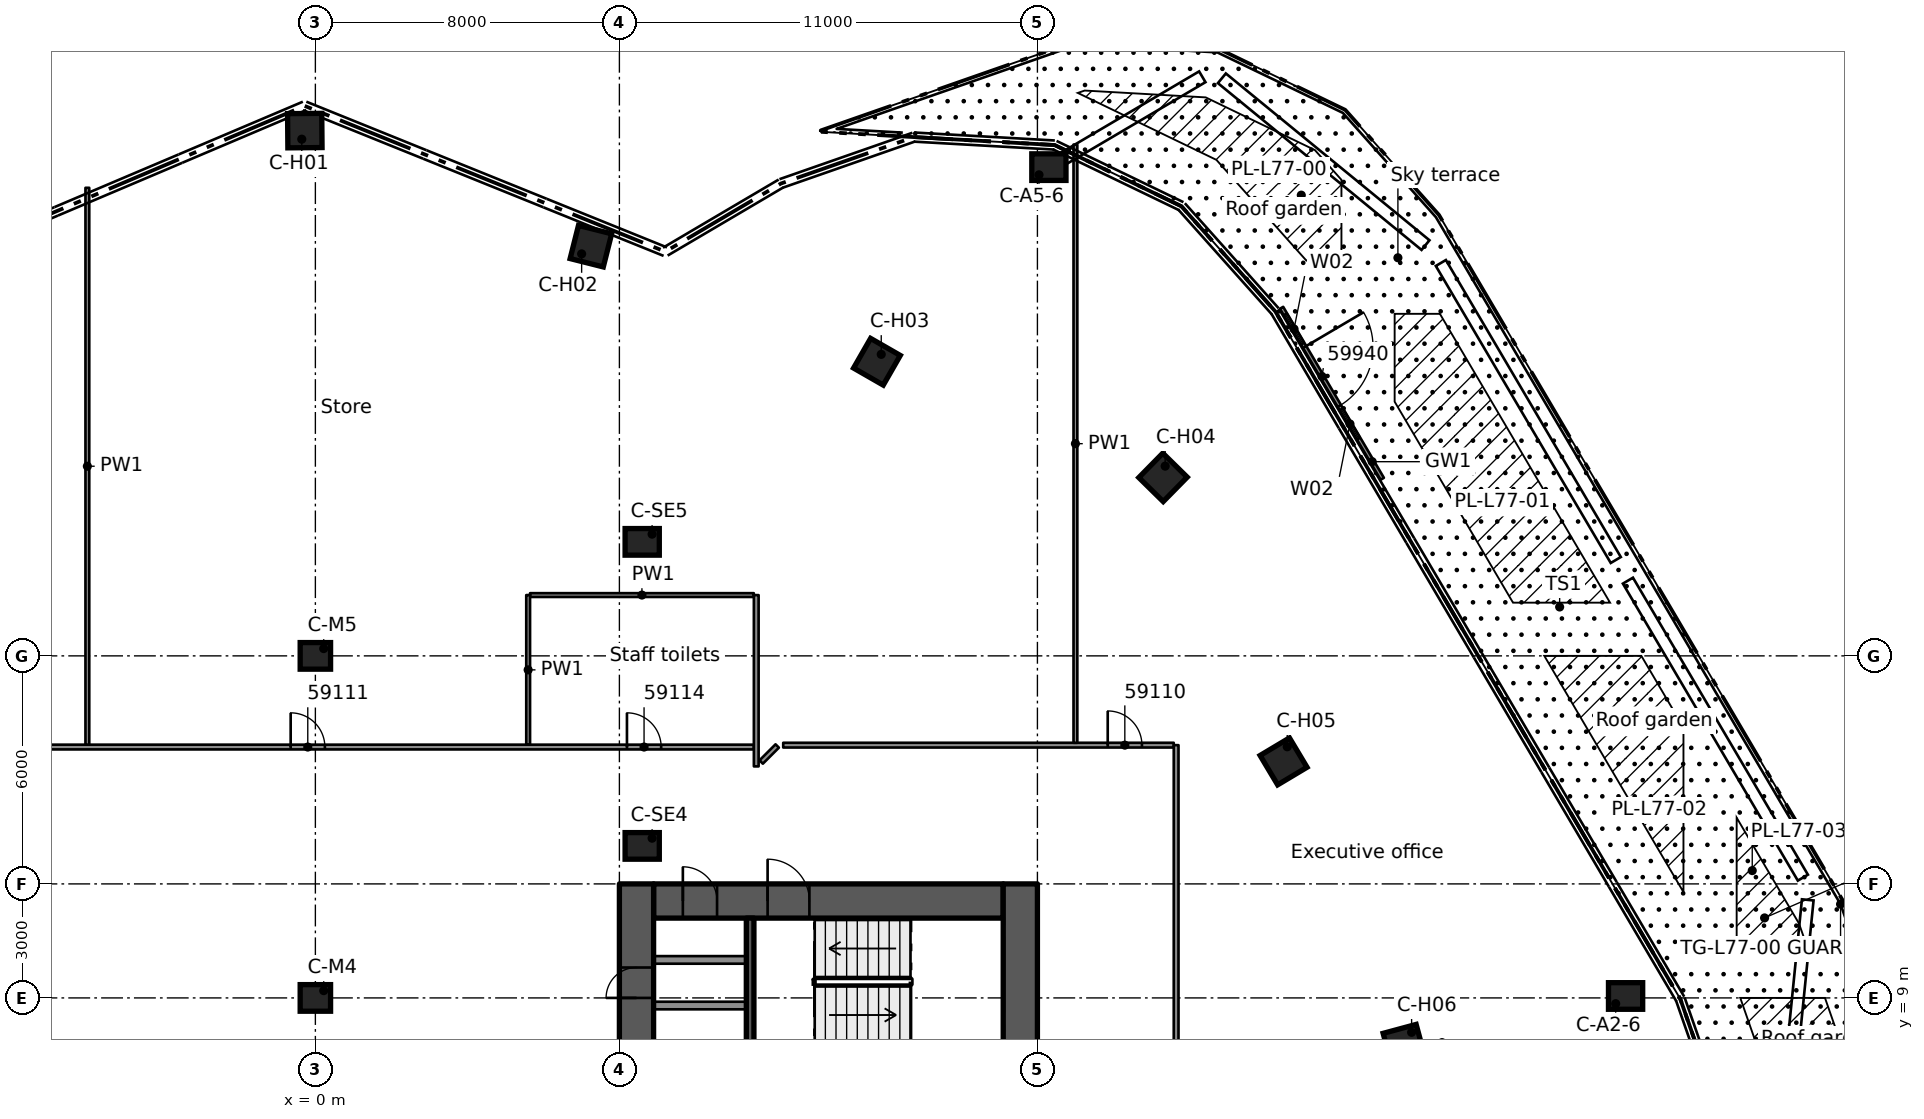
"""IFC4 building model, lengths in metres.
Left out: names, types, materials, properties, quantities, classifications, styles, units other than length and angle.
Written with IfcOpenShell. Run it as: python <this file> out.ifc"""

import sys

from ifc_helpers import new_model, si_unit, direction, frame, frame_2d, origin, origin_2d, place, context, subcontext, project, spatial, rectangle, extrude, element, fill, save


model = new_model("IFC4")
c1 = context("Model", 3, precision=1e-05, world=origin(), true_north=direction((0.0, 1.0)))
c2 = subcontext(c1, "Body", "Model", "MODEL_VIEW")
j1 = project(units=[si_unit("LENGTHUNIT", "METRE"), si_unit("PLANEANGLEUNIT", "RADIAN")], contexts=[c1])
p1 = place(None, origin())
s1 = spatial("IfcSite", under=j1, at=p1, CompositionType="ELEMENT")
p2 = place(p1, origin())
s2 = spatial("IfcBuilding", under=s1, at=p2, CompositionType="ELEMENT")
p3 = place(p2, frame((0.0, 0.0, 289.4)))
s3 = spatial("IfcBuildingStorey", under=s2, at=p3, CompositionType="ELEMENT", Elevation=289.4)
p4 = place(p3, frame((8.9, 11.55, 0.0), z_axis=(0.0, 0.0, 1.0), x_axis=(1.0, 0.0, 0.0)))
e1 = element("IfcWall", 1, at=p4, inside=s3, PredefinedType="SHEAR", context=c2, shape_type="SweptSolid", body=[
    extrude(rectangle(XDim=9.2, YDim=0.9, at=frame_2d((4.6, 0.0))), origin(), (0.0, 0.0, 1.0), 3.5),
])
p5 = place(p4, frame((3.0, 0.0, 0.0)))
e2 = element("IfcOpeningElement", 2, at=p5, cuts=e1, PredefinedType="OPENING", context=c2, shape_type="SweptSolid", body=[
    extrude(rectangle(XDim=1.1, YDim=2.1, at=frame_2d((0.55, 1.05))), frame((0.0, 0.46, 0.0), z_axis=(0.0, -1.0, 0.0), x_axis=(1.0, 0.0, 0.0)), (0.0, 0.0, 1.0), 0.92),
])
p6 = place(p4, frame((0.77, 0.0, 0.0)))
e3 = element("IfcOpeningElement", 3, at=p6, cuts=e1, PredefinedType="OPENING", context=c2, shape_type="SweptSolid", body=[
    extrude(rectangle(XDim=0.9, YDim=2.1, at=frame_2d((0.45, 1.05))), frame((0.0, 0.46, 0.0), z_axis=(0.0, -1.0, 0.0), x_axis=(1.0, 0.0, 0.0)), (0.0, 0.0, 1.0), 0.92),
])
p7 = place(p3, frame((8.45, -12.0, 0.0), z_axis=(0.0, 0.0, 1.0), x_axis=(0.0, 1.0, 0.0)))
e4 = element("IfcWall", 4, at=p7, inside=s3, PredefinedType="SHEAR", context=c2, shape_type="SweptSolid", body=[
    extrude(rectangle(XDim=24.0, YDim=0.9, at=frame_2d((12.0, 0.0))), origin(), (0.0, 0.0, 1.0), 3.5),
])
p8 = place(p7, frame((12.6, 0.0, 0.0)))
e5 = element("IfcOpeningElement", 5, at=p8, cuts=e4, PredefinedType="OPENING", context=c2, shape_type="SweptSolid", body=[
    extrude(rectangle(XDim=1.8, YDim=2.1, at=frame_2d((0.9, 1.05))), frame((0.0, 0.46, 0.0), z_axis=(0.0, -1.0, 0.0), x_axis=(1.0, 0.0, 0.0)), (0.0, 0.0, 1.0), 0.92),
])
p9 = place(p7, frame((3.25, 0.0, 0.0)))
e6 = element("IfcOpeningElement", 6, at=p9, cuts=e4, PredefinedType="OPENING", context=c2, shape_type="SweptSolid", body=[
    extrude(rectangle(XDim=1.1, YDim=2.1, at=frame_2d((0.55, 1.05))), frame((0.0, 0.46, 0.0), z_axis=(0.0, -1.0, 0.0), x_axis=(1.0, 0.0, 0.0)), (0.0, 0.0, 1.0), 0.92),
])
p10 = place(p7, frame((21.0, 0.0, 0.0)))
e7 = element("IfcOpeningElement", 7, at=p10, cuts=e4, PredefinedType="OPENING", context=c2, shape_type="SweptSolid", body=[
    extrude(rectangle(XDim=0.8, YDim=2.1, at=frame_2d((0.4, 1.05))), frame((0.0, 0.46, 0.0), z_axis=(0.0, -1.0, 0.0), x_axis=(1.0, 0.0, 0.0)), (0.0, 0.0, 1.0), 0.92),
])
p11 = place(p3, frame((18.55, -12.0, 0.0), z_axis=(0.0, 0.0, 1.0), x_axis=(0.0, 1.0, 0.0)))
e8 = element("IfcWall", 8, at=p11, inside=s3, PredefinedType="SHEAR", context=c2, shape_type="SweptSolid", body=[
    extrude(rectangle(XDim=24.0, YDim=0.9, at=frame_2d((12.0, 0.0))), origin(), (0.0, 0.0, 1.0), 3.5),
])
p12 = place(p11, frame((12.1, 0.0, 0.0)))
e9 = element("IfcOpeningElement", 9, at=p12, cuts=e8, PredefinedType="OPENING", context=c2, shape_type="SweptSolid", body=[
    extrude(rectangle(XDim=1.8, YDim=2.1, at=frame_2d((0.9, 1.05))), frame((0.0, 0.46, 0.0), z_axis=(0.0, -1.0, 0.0), x_axis=(1.0, 0.0, 0.0)), (0.0, 0.0, 1.0), 0.92),
])
for number, where, z_axis, x_axis in (
    (10, (34.477, 9.051, 0.0), (0.0, 0.0, 1.0), (1.0, 0.0, 0.0)),
    (11, (19.302, 30.86, 0.0), (0.0, 0.0, 1.0), (1.0, 0.0, 0.0)),
):
    element("IfcColumn", number, at=place(p3, frame(where, z_axis=z_axis, x_axis=x_axis)), inside=s3, PredefinedType="COLUMN", context=c2, shape_type="SweptSolid", body=[
        extrude(rectangle(XDim=0.9, YDim=0.7, at=origin_2d()), origin(), (0.0, 0.0, 1.0), 3.5),
    ])
for number, where, z_axis, x_axis in (
    (12, (-0.278, 31.821, 0.0), (0.0, 0.0, 1.0), (-0.009, 1.0, 0.0)),
    (13, (7.25, 28.78, 0.0), (0.0, 0.0, 1.0), (0.244, 0.97, 0.0)),
    (14, (14.777, 25.739, 0.0), (0.0, 0.0, 1.0), (0.498, 0.867, 0.0)),
    (15, (22.305, 22.697, 0.0), (0.0, 0.0, 1.0), (0.701, 0.713, 0.0)),
    (16, (25.477, 15.224, 0.0), (0.0, 0.0, 1.0), (0.858, 0.513, 0.0)),
    (17, (28.649, 7.751, 0.0), (0.0, 0.0, 1.0), (0.965, 0.261, 0.0)),
):
    element("IfcColumn", number, at=place(p3, frame(where, z_axis=z_axis, x_axis=x_axis)), inside=s3, PredefinedType="COLUMN", context=c2, shape_type="SweptSolid", body=[
        extrude(rectangle(XDim=0.9, YDim=0.9, at=origin_2d()), origin(), (0.0, 0.0, 1.0), 3.5),
    ])
for number, where, z_axis, x_axis in (
    (18, (0.0, 9.0, 0.0), (0.0, 0.0, 1.0), (1.0, 0.0, 0.0)),
    (19, (0.0, 18.0, 0.0), (0.0, 0.0, 1.0), (1.0, 0.0, 0.0)),
):
    element("IfcColumn", number, at=place(p3, frame(where, z_axis=z_axis, x_axis=x_axis)), inside=s3, PredefinedType="COLUMN", context=c2, shape_type="SweptSolid", body=[
        extrude(rectangle(XDim=0.8, YDim=0.7, at=origin_2d()), origin(), (0.0, 0.0, 1.0), 3.5),
    ])
for number, where, z_axis, x_axis in (
    (20, (8.6, 13.0, 0.0), (0.0, 0.0, 1.0), (1.0, 0.0, 0.0)),
    (21, (8.6, 21.0, 0.0), (0.0, 0.0, 1.0), (1.0, 0.0, 0.0)),
):
    element("IfcColumn", number, at=place(p3, frame(where, z_axis=z_axis, x_axis=x_axis)), inside=s3, PredefinedType="COLUMN", context=c2, shape_type="SweptSolid", body=[
        extrude(rectangle(XDim=0.9, YDim=0.7, at=origin_2d()), origin(), (0.0, 0.0, 1.0), 3.5),
    ])
p13 = place(p3, frame((11.44, 11.1, 0.0), z_axis=(0.0, 0.0, 1.0), x_axis=(0.0, -1.0, 0.0)))
e22 = element("IfcWall", 22, at=p13, inside=s3, PredefinedType="SOLIDWALL", context=c2, shape_type="SweptSolid", body=[
    extrude(rectangle(XDim=4.125, YDim=0.2, at=frame_2d((2.062, 0.0))), origin(), (0.0, 0.0, 1.0), 3.09),
])
for number, where, z_axis, x_axis in (
    (23, (8.9, 10.0, 0.0), (0.0, 0.0, 1.0), (1.0, 0.0, 0.0)),
    (24, (8.9, 8.8, 0.0), (0.0, 0.0, 1.0), (1.0, 0.0, 0.0)),
):
    element("IfcWall", number, at=place(p3, frame(where, z_axis=z_axis, x_axis=x_axis)), inside=s3, PredefinedType="PARTITIONING", context=c2, shape_type="SweptSolid", body=[
        extrude(rectangle(XDim=2.44, YDim=0.2, at=frame_2d((1.22, 0.0))), origin(), (0.0, 0.0, 1.0), 3.09),
    ])
p14 = place(p3, frame((25.424, 27.159, 0.0), z_axis=(0.0, 0.0, 1.0), x_axis=(0.507520639253, -0.861639600258, 0.0)))
e25 = element("IfcWall", 25, at=p14, inside=s3, PredefinedType="STANDARD", context=c2, shape_type="SweptSolid", body=[
    extrude(rectangle(XDim=5.222, YDim=0.1, at=frame_2d((2.611, 0.0))), origin(), (0.0, 0.0, 1.0), 3.18),
])
p15 = place(p14, frame((1.197, 0.0, 0.0)))
e26 = element("IfcOpeningElement", 26, at=p15, cuts=e25, PredefinedType="OPENING", context=c2, shape_type="SweptSolid", body=[
    extrude(rectangle(XDim=1.8, YDim=2.4, at=frame_2d((0.9, 1.2))), frame((0.0, 0.06, 0.0), z_axis=(0.0, -1.0, 0.0), x_axis=(1.0, 0.0, 0.0)), (0.0, 0.0, 1.0), 0.12),
])
p16 = place(p14, frame((0.197, 0.0, 0.0)))
e27 = element("IfcOpeningElement", 27, at=p16, cuts=e25, PredefinedType="OPENING", context=c2, shape_type="SweptSolid", body=[
    extrude(rectangle(XDim=0.9, YDim=2.4, at=frame_2d((0.45, 1.2))), frame((0.0, 0.06, 0.0), z_axis=(0.0, -1.0, 0.0), x_axis=(1.0, 0.0, 0.0)), (0.0, 0.0, 1.0), 0.12),
])
p17 = place(p14, frame((3.096, 0.0, 0.0)))
e28 = element("IfcOpeningElement", 28, at=p17, cuts=e25, PredefinedType="OPENING", context=c2, shape_type="SweptSolid", body=[
    extrude(rectangle(XDim=0.9, YDim=2.4, at=frame_2d((0.45, 1.2))), frame((0.0, 0.06, 0.0), z_axis=(0.0, -1.0, 0.0), x_axis=(1.0, 0.0, 0.0)), (0.0, 0.0, 1.0), 0.12),
])
p18 = place(p3, frame((-11.59, 15.601, 0.0), z_axis=(0.0, 0.0, 1.0), x_axis=(1.0, 0.0, 0.0)))
e29 = element("IfcWall", 29, at=p18, inside=s3, PredefinedType="PARTITIONING", context=c2, shape_type="SweptSolid", body=[
    extrude(rectangle(XDim=23.127, YDim=0.125, at=frame_2d((11.563, 0.0))), origin(), (0.0, 0.0, 1.0), 3.15),
])
p19 = place(p18, frame((10.94, 0.0, 0.0)))
e30 = element("IfcOpeningElement", 30, at=p19, cuts=e29, PredefinedType="OPENING", context=c2, shape_type="SweptSolid", body=[
    extrude(rectangle(XDim=0.9, YDim=2.1, at=frame_2d((0.45, 1.05))), frame((0.0, 0.073, 0.0), z_axis=(0.0, -1.0, 0.0), x_axis=(1.0, 0.0, 0.0)), (0.0, 0.0, 1.0), 0.145),
])
p20 = place(p18, frame((19.789, 0.0, 0.0)))
e31 = element("IfcOpeningElement", 31, at=p20, cuts=e29, PredefinedType="OPENING", context=c2, shape_type="SweptSolid", body=[
    extrude(rectangle(XDim=0.9, YDim=2.1, at=frame_2d((0.45, 1.05))), frame((0.0, 0.073, 0.0), z_axis=(0.0, -1.0, 0.0), x_axis=(1.0, 0.0, 0.0)), (0.0, 0.0, 1.0), 0.145),
])
p21 = place(p3, frame((12.311, 15.651, 0.0), z_axis=(0.0, 0.0, 1.0), x_axis=(1.0, 0.0, 0.0)))
e32 = element("IfcWall", 32, at=p21, inside=s3, PredefinedType="PARTITIONING", context=c2, shape_type="SweptSolid", body=[
    extrude(rectangle(XDim=10.276, YDim=0.125, at=frame_2d((5.138, 0.0))), origin(), (0.0, 0.0, 1.0), 3.15),
])
p22 = place(p21, frame((8.539, 0.0, 0.0)))
e33 = element("IfcOpeningElement", 33, at=p22, cuts=e32, PredefinedType="OPENING", context=c2, shape_type="SweptSolid", body=[
    extrude(rectangle(XDim=0.9, YDim=2.1, at=frame_2d((0.45, 1.05))), frame((0.0, 0.073, 0.0), z_axis=(0.0, -1.0, 0.0), x_axis=(1.0, 0.0, 0.0)), (0.0, 0.0, 1.0), 0.145),
])
p23 = place(p3, frame((5.649, 19.6, 0.0), z_axis=(0.0, 0.0, 1.0), x_axis=(1.0, 0.0, 0.0)))
e34 = element("IfcWall", 34, at=p23, inside=s3, PredefinedType="PARTITIONING", context=c2, shape_type="SweptSolid", body=[
    extrude(rectangle(XDim=5.888, YDim=0.1, at=frame_2d((2.944, 0.0))), origin(), (0.0, 0.0, 1.0), 3.15),
])
p24 = place(p3, frame((11.731, 15.207, 0.0), z_axis=(0.0, 0.0, 1.0), x_axis=(0.707311295066, 0.70690220814, 0.0)))
e35 = element("IfcWall", 35, at=p24, inside=s3, PredefinedType="PARTITIONING", context=c2, shape_type="SweptSolid", body=[
    extrude(rectangle(XDim=0.597, YDim=0.125, at=frame_2d((0.298, 0.0))), origin(), (0.0, 0.0, 1.0), 3.15),
])
p25 = place(p3, frame((22.65, 15.651, 0.0), z_axis=(0.0, 0.0, 1.0), x_axis=(0.0, -1.0, 0.0)))
e36 = element("IfcWall", 36, at=p25, inside=s3, PredefinedType="PARTITIONING", context=c2, shape_type="SweptSolid", body=[
    extrude(rectangle(XDim=23.475, YDim=0.125, at=frame_2d((11.737, 0.0))), origin(), (0.0, 0.0, 1.0), 3.15),
])
p26 = place(p25, frame((19.001, 0.0, 0.0)))
e37 = element("IfcOpeningElement", 37, at=p26, cuts=e36, PredefinedType="OPENING", context=c2, shape_type="SweptSolid", body=[
    extrude(rectangle(XDim=0.9, YDim=2.1, at=frame_2d((0.45, 1.05))), frame((0.0, 0.073, 0.0), z_axis=(0.0, -1.0, 0.0), x_axis=(1.0, 0.0, 0.0)), (0.0, 0.0, 1.0), 0.145),
])
p27 = place(p25, frame((11.177, 0.0, 0.0)))
e38 = element("IfcOpeningElement", 38, at=p27, cuts=e36, PredefinedType="OPENING", context=c2, shape_type="SweptSolid", body=[
    extrude(rectangle(XDim=0.9, YDim=2.1, at=frame_2d((0.45, 1.05))), frame((0.0, 0.073, 0.0), z_axis=(0.0, -1.0, 0.0), x_axis=(1.0, 0.0, 0.0)), (0.0, 0.0, 1.0), 0.145),
])
p28 = place(p3, frame((20.0, 15.713, 0.0), z_axis=(0.0, 0.0, 1.0), x_axis=(0.0, 1.0, 0.0)))
e39 = element("IfcWall", 39, at=p28, inside=s3, PredefinedType="PARTITIONING", context=c2, shape_type="SweptSolid", body=[
    extrude(rectangle(XDim=15.741, YDim=0.1, at=frame_2d((7.871, 0.0))), origin(), (0.0, 0.0, 1.0), 3.15),
])
p29 = place(p3, frame((11.601, 15.092, 0.0), z_axis=(0.0, 0.0, 1.0), x_axis=(0.0, 1.0, 0.0)))
e40 = element("IfcWall", 40, at=p29, inside=s3, PredefinedType="PARTITIONING", context=c2, shape_type="SweptSolid", body=[
    extrude(rectangle(XDim=4.507, YDim=0.125, at=frame_2d((2.253, 0.0))), origin(), (0.0, 0.0, 1.0), 3.15),
])
p30 = place(p3, frame((5.599, 15.664, 0.0), z_axis=(0.0, 0.0, 1.0), x_axis=(0.0, 1.0, 0.0)))
e41 = element("IfcWall", 41, at=p30, inside=s3, PredefinedType="PARTITIONING", context=c2, shape_type="SweptSolid", body=[
    extrude(rectangle(XDim=3.936, YDim=0.1, at=frame_2d((1.968, 0.0))), origin(), (0.0, 0.0, 1.0), 3.15),
])
p31 = place(p3, frame((-6.0, 15.664, 0.0), z_axis=(0.0, 0.0, 1.0), x_axis=(0.0, 1.0, 0.0)))
e42 = element("IfcWall", 42, at=p31, inside=s3, PredefinedType="PARTITIONING", context=c2, shape_type="SweptSolid", body=[
    extrude(rectangle(XDim=14.652, YDim=0.1, at=frame_2d((7.326, 0.0))), origin(), (0.0, 0.0, 1.0), 3.15),
])
p32 = place(p5, origin())
e43 = element("IfcDoor", 43, at=p32, inside=s3, OperationType="SINGLE_SWING_LEFT", PredefinedType="DOOR", context=c2, shape_type="SweptSolid", body=[
    extrude(rectangle(XDim=1.1, YDim=2.1, at=frame_2d((0.55, 1.05))), frame((0.0, 0.025, 0.0), z_axis=(0.0, -1.0, 0.0), x_axis=(1.0, 0.0, 0.0)), (0.0, 0.0, 1.0), 0.05),
])
fill(e2, e43)
p33 = place(p6, origin())
e44 = element("IfcDoor", 44, at=p33, inside=s3, OperationType="SINGLE_SWING_LEFT", PredefinedType="DOOR", context=c2, shape_type="SweptSolid", body=[
    extrude(rectangle(XDim=0.9, YDim=2.1, at=frame_2d((0.45, 1.05))), frame((0.0, 0.025, 0.0), z_axis=(0.0, -1.0, 0.0), x_axis=(1.0, 0.0, 0.0)), (0.0, 0.0, 1.0), 0.05),
])
fill(e3, e44)
p34 = place(p10, origin())
e45 = element("IfcDoor", 45, at=p34, inside=s3, OperationType="SINGLE_SWING_RIGHT", PredefinedType="DOOR", context=c2, shape_type="SweptSolid", body=[
    extrude(rectangle(XDim=0.8, YDim=2.1, at=frame_2d((0.4, 1.05))), frame((0.0, 0.025, 0.0), z_axis=(0.0, -1.0, 0.0), x_axis=(1.0, 0.0, 0.0)), (0.0, 0.0, 1.0), 0.05),
])
fill(e7, e45)
p35 = place(p15, origin())
e46 = element("IfcDoor", 46, at=p35, inside=s3, OperationType="DOUBLE_DOOR_SINGLE_SWING", PredefinedType="DOOR", context=c2, shape_type="SweptSolid", body=[
    extrude(rectangle(XDim=1.8, YDim=2.4, at=frame_2d((0.9, 1.2))), frame((0.0, 0.025, 0.0), z_axis=(0.0, -1.0, 0.0), x_axis=(1.0, 0.0, 0.0)), (0.0, 0.0, 1.0), 0.05),
])
fill(e26, e46)
p36 = place(p16, origin())
e47 = element("IfcWindow", 47, at=p36, inside=s3, PartitioningType="SINGLE_PANEL", PredefinedType="WINDOW", context=c2, shape_type="SweptSolid", body=[
    extrude(rectangle(XDim=0.9, YDim=2.4, at=frame_2d((0.45, 1.2))), frame((0.0, 0.03, 0.0), z_axis=(0.0, -1.0, 0.0), x_axis=(1.0, 0.0, 0.0)), (0.0, 0.0, 1.0), 0.06),
])
fill(e27, e47)
p37 = place(p17, origin())
e48 = element("IfcWindow", 48, at=p37, inside=s3, PartitioningType="SINGLE_PANEL", PredefinedType="WINDOW", context=c2, shape_type="SweptSolid", body=[
    extrude(rectangle(XDim=0.9, YDim=2.4, at=frame_2d((0.45, 1.2))), frame((0.0, 0.03, 0.0), z_axis=(0.0, -1.0, 0.0), x_axis=(1.0, 0.0, 0.0)), (0.0, 0.0, 1.0), 0.06),
])
fill(e28, e48)
p38 = place(p22, origin())
e49 = element("IfcDoor", 49, at=p38, inside=s3, OperationType="SINGLE_SWING_RIGHT", PredefinedType="DOOR", context=c2, shape_type="SweptSolid", body=[
    extrude(rectangle(XDim=0.9, YDim=2.1, at=frame_2d((0.45, 1.05))), frame((0.0, 0.025, 0.0), z_axis=(0.0, -1.0, 0.0), x_axis=(1.0, 0.0, 0.0)), (0.0, 0.0, 1.0), 0.05),
])
fill(e33, e49)
p39 = place(p19, origin())
e50 = element("IfcDoor", 50, at=p39, inside=s3, OperationType="SINGLE_SWING_LEFT", PredefinedType="DOOR", context=c2, shape_type="SweptSolid", body=[
    extrude(rectangle(XDim=0.9, YDim=2.1, at=frame_2d((0.45, 1.05))), frame((0.0, 0.025, 0.0), z_axis=(0.0, -1.0, 0.0), x_axis=(1.0, 0.0, 0.0)), (0.0, 0.0, 1.0), 0.05),
])
fill(e30, e50)
p40 = place(p20, origin())
e51 = element("IfcDoor", 51, at=p40, inside=s3, OperationType="SINGLE_SWING_RIGHT", PredefinedType="DOOR", context=c2, shape_type="SweptSolid", body=[
    extrude(rectangle(XDim=0.9, YDim=2.1, at=frame_2d((0.45, 1.05))), frame((0.0, 0.025, 0.0), z_axis=(0.0, -1.0, 0.0), x_axis=(1.0, 0.0, 0.0)), (0.0, 0.0, 1.0), 0.05),
])
fill(e31, e51)
save(model, sys.argv[1])
